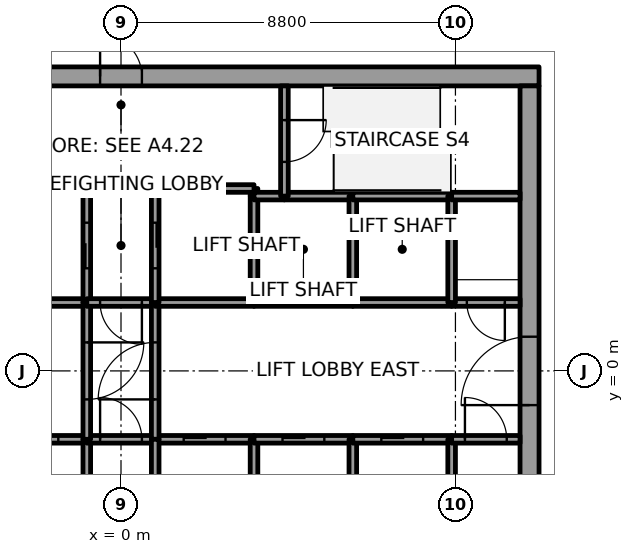
"""IFC4 building model, lengths in metres.
Left out: names, types, materials, properties, quantities, classifications, styles, units other than length and angle.
Written with IfcOpenShell. Run it as: python <this file> out.ifc"""

import sys

from ifc_helpers import new_model, si_unit, direction, frame, frame_2d, origin, place, context, subcontext, project, spatial, rectangle, extrude, element, fill, save


model = new_model("IFC4")
c1 = context("Model", 3, precision=1e-05, world=origin(), true_north=direction((0.0, 1.0)))
c2 = subcontext(c1, "Body", "Model", "MODEL_VIEW")
j1 = project(units=[si_unit("LENGTHUNIT", "METRE"), si_unit("PLANEANGLEUNIT", "RADIAN")], contexts=[c1])
p1 = place(None, origin())
s1 = spatial("IfcSite", under=j1, at=p1, CompositionType="ELEMENT")
p2 = place(p1, origin())
s2 = spatial("IfcBuilding", under=s1, at=p2, CompositionType="ELEMENT")
p3 = place(p2, frame((0.0, 0.0, 96.1)))
s3 = spatial("IfcBuildingStorey", under=s2, at=p3, CompositionType="ELEMENT", Elevation=96.1)
p4 = place(p3, frame((-11.0, 7.75, 0.0), z_axis=(0.0, 0.0, 1.0), x_axis=(1.0, 0.0, 0.0)))
e1 = element("IfcWall", 1, at=p4, inside=s3, PredefinedType="SHEAR", context=c2, shape_type="SweptSolid", body=[
    extrude(rectangle(XDim=22.0, YDim=0.5, at=frame_2d((11.0, 0.0))), origin(), (0.0, 0.0, 1.0), 3.7),
])
p5 = place(p4, frame((10.45, 0.0, 0.0)))
e2 = element("IfcOpeningElement", 2, at=p5, cuts=e1, PredefinedType="OPENING", context=c2, shape_type="SweptSolid", body=[
    extrude(rectangle(XDim=1.1, YDim=2.1, at=frame_2d((0.55, 1.05))), frame((0.0, 0.25, 0.0), z_axis=(0.0, -1.0, 0.0), x_axis=(1.0, 0.0, 0.0)), (0.0, 0.0, 1.0), 0.5),
])
p6 = place(p3, frame((10.75, -7.5, 0.0), z_axis=(0.0, 0.0, 1.0), x_axis=(0.0, 1.0, 0.0)))
e3 = element("IfcWall", 3, at=p6, inside=s3, PredefinedType="SHEAR", context=c2, shape_type="SweptSolid", body=[
    extrude(rectangle(XDim=15.0, YDim=0.5, at=frame_2d((7.5, 0.0))), origin(), (0.0, 0.0, 1.0), 3.7),
])
p7 = place(p6, frame((6.6, 0.0, 0.0)))
e4 = element("IfcOpeningElement", 4, at=p7, cuts=e3, PredefinedType="OPENING", context=c2, shape_type="SweptSolid", body=[
    extrude(rectangle(XDim=1.8, YDim=2.1, at=frame_2d((0.9, 1.05))), frame((0.0, 0.25, 0.0), z_axis=(0.0, -1.0, 0.0), x_axis=(1.0, 0.0, 0.0)), (0.0, 0.0, 1.0), 0.5),
])
p8 = place(p3, frame((-3.5, -1.8, 0.0), z_axis=(0.0, 0.0, 1.0), x_axis=(1.0, 0.0, 0.0)))
e5 = element("IfcWall", 5, at=p8, inside=s3, PredefinedType="SOLIDWALL", context=c2, shape_type="SweptSolid", body=[
    extrude(rectangle(XDim=2.6, YDim=0.2, at=frame_2d((1.3, 0.0))), origin(), (0.0, 0.0, 1.0), 3.55),
])
p9 = place(p8, frame((0.75, 0.0, 0.0)))
e6 = element("IfcOpeningElement", 6, at=p9, cuts=e5, PredefinedType="OPENING", context=c2, shape_type="SweptSolid", body=[
    extrude(rectangle(XDim=1.1, YDim=2.1, at=frame_2d((0.55, 1.05))), frame((0.0, 0.1, 0.0), z_axis=(0.0, -1.0, 0.0), x_axis=(1.0, 0.0, 0.0)), (0.0, 0.0, 1.0), 0.2),
])
p10 = place(p3, frame((-0.9, 1.8, 0.0), z_axis=(0.0, 0.0, 1.0), x_axis=(-1.0, 0.0, 0.0)))
e7 = element("IfcWall", 7, at=p10, inside=s3, PredefinedType="SOLIDWALL", context=c2, shape_type="SweptSolid", body=[
    extrude(rectangle(XDim=2.6, YDim=0.2, at=frame_2d((1.3, 0.0))), origin(), (0.0, 0.0, 1.0), 3.55),
])
p11 = place(p3, frame((-0.9, 1.8, 0.0), z_axis=(0.0, 0.0, 1.0), x_axis=(0.0, 1.0, 0.0)))
e8 = element("IfcWall", 8, at=p11, inside=s3, PredefinedType="SOLIDWALL", context=c2, shape_type="SweptSolid", body=[
    extrude(rectangle(XDim=3.0, YDim=0.2, at=frame_2d((1.5, 0.0))), origin(), (0.0, 0.0, 1.0), 3.55),
])
p12 = place(p11, frame((0.9, 0.0, 0.0)))
e9 = element("IfcOpeningElement", 9, at=p12, cuts=e8, PredefinedType="OPENING", context=c2, shape_type="SweptSolid", body=[
    extrude(rectangle(XDim=1.2, YDim=2.1, at=frame_2d((0.6, 1.05))), frame((0.0, 0.1, 0.0), z_axis=(0.0, -1.0, 0.0), x_axis=(1.0, 0.0, 0.0)), (0.0, 0.0, 1.0), 0.2),
])
p13 = place(p3, frame((-0.9, 4.8, 0.0), z_axis=(0.0, 0.0, 1.0), x_axis=(-1.0, 0.0, 0.0)))
e10 = element("IfcWall", 10, at=p13, inside=s3, PredefinedType="SOLIDWALL", context=c2, shape_type="SweptSolid", body=[
    extrude(rectangle(XDim=2.6, YDim=0.2, at=frame_2d((1.3, 0.0))), origin(), (0.0, 0.0, 1.0), 3.55),
])
p14 = place(p3, frame((-0.9, -4.6, 0.0), z_axis=(0.0, 0.0, 1.0), x_axis=(0.0, 1.0, 0.0)))
e11 = element("IfcWall", 11, at=p14, inside=s3, PredefinedType="SOLIDWALL", context=c2, shape_type="SweptSolid", body=[
    extrude(rectangle(XDim=2.8, YDim=0.2, at=frame_2d((1.4, 0.0))), origin(), (0.0, 0.0, 1.0), 3.55),
])
p15 = place(p3, frame((-0.9, -1.8, 0.0), z_axis=(0.0, 0.0, 1.0), x_axis=(1.0, 0.0, 0.0)))
e12 = element("IfcWall", 12, at=p15, inside=s3, PredefinedType="SOLIDWALL", context=c2, shape_type="SweptSolid", body=[
    extrude(rectangle(XDim=1.8, YDim=0.2, at=frame_2d((0.9, 0.0))), origin(), (0.0, 0.0, 1.0), 3.55),
])
p16 = place(p15, frame((0.35, 0.0, 0.0)))
e13 = element("IfcOpeningElement", 13, at=p16, cuts=e12, PredefinedType="OPENING", context=c2, shape_type="SweptSolid", body=[
    extrude(rectangle(XDim=1.1, YDim=2.1, at=frame_2d((0.55, 1.05))), frame((0.0, 0.1, 0.0), z_axis=(0.0, -1.0, 0.0), x_axis=(1.0, 0.0, 0.0)), (0.0, 0.0, 1.0), 0.2),
])
p17 = place(p3, frame((-0.9, 1.8, 0.0), z_axis=(0.0, 0.0, 1.0), x_axis=(0.0, -1.0, 0.0)))
e14 = element("IfcWall", 14, at=p17, inside=s3, PredefinedType="SOLIDWALL", context=c2, shape_type="SweptSolid", body=[
    extrude(rectangle(XDim=3.6, YDim=0.2, at=frame_2d((1.8, 0.0))), origin(), (0.0, 0.0, 1.0), 3.55),
])
p18 = place(p17, frame((1.05, 0.0, 0.0)))
e15 = element("IfcOpeningElement", 15, at=p18, cuts=e14, PredefinedType="OPENING", context=c2, shape_type="SweptSolid", body=[
    extrude(rectangle(XDim=1.5, YDim=2.1, at=frame_2d((0.75, 1.05))), frame((0.0, 0.1, 0.0), z_axis=(0.0, -1.0, 0.0), x_axis=(1.0, 0.0, 0.0)), (0.0, 0.0, 1.0), 0.2),
])
p19 = place(p3, frame((0.9, 1.8, 0.0), z_axis=(0.0, 0.0, 1.0), x_axis=(-1.0, 0.0, 0.0)))
e16 = element("IfcWall", 16, at=p19, inside=s3, PredefinedType="SOLIDWALL", context=c2, shape_type="SweptSolid", body=[
    extrude(rectangle(XDim=1.8, YDim=0.2, at=frame_2d((0.9, 0.0))), origin(), (0.0, 0.0, 1.0), 3.55),
])
p20 = place(p19, frame((0.35, 0.0, 0.0)))
e17 = element("IfcOpeningElement", 17, at=p20, cuts=e16, PredefinedType="OPENING", context=c2, shape_type="SweptSolid", body=[
    extrude(rectangle(XDim=1.1, YDim=2.1, at=frame_2d((0.55, 1.05))), frame((0.0, 0.1, 0.0), z_axis=(0.0, -1.0, 0.0), x_axis=(1.0, 0.0, 0.0)), (0.0, 0.0, 1.0), 0.2),
])
p21 = place(p3, frame((0.9, -1.8, 0.0), z_axis=(0.0, 0.0, 1.0), x_axis=(1.0, 0.0, 0.0)))
e18 = element("IfcWall", 18, at=p21, inside=s3, PredefinedType="SOLIDWALL", context=c2, shape_type="SweptSolid", body=[
    extrude(rectangle(XDim=2.6, YDim=0.2, at=frame_2d((1.3, 0.0))), origin(), (0.0, 0.0, 1.0), 3.55),
])
p22 = place(p21, frame((0.75, 0.0, 0.0)))
e19 = element("IfcOpeningElement", 19, at=p22, cuts=e18, PredefinedType="OPENING", context=c2, shape_type="SweptSolid", body=[
    extrude(rectangle(XDim=1.1, YDim=2.1, at=frame_2d((0.55, 1.05))), frame((0.0, 0.1, 0.0), z_axis=(0.0, -1.0, 0.0), x_axis=(1.0, 0.0, 0.0)), (0.0, 0.0, 1.0), 0.2),
])
p23 = place(p3, frame((0.9, -1.8, 0.0), z_axis=(0.0, 0.0, 1.0), x_axis=(0.0, 1.0, 0.0)))
e20 = element("IfcWall", 20, at=p23, inside=s3, PredefinedType="SOLIDWALL", context=c2, shape_type="SweptSolid", body=[
    extrude(rectangle(XDim=3.6, YDim=0.2, at=frame_2d((1.8, 0.0))), origin(), (0.0, 0.0, 1.0), 3.55),
])
p24 = place(p23, frame((1.05, 0.0, 0.0)))
e21 = element("IfcOpeningElement", 21, at=p24, cuts=e20, PredefinedType="OPENING", context=c2, shape_type="SweptSolid", body=[
    extrude(rectangle(XDim=1.5, YDim=2.1, at=frame_2d((0.75, 1.05))), frame((0.0, 0.1, 0.0), z_axis=(0.0, -1.0, 0.0), x_axis=(1.0, 0.0, 0.0)), (0.0, 0.0, 1.0), 0.2),
])
p25 = place(p3, frame((0.9, -1.8, 0.0), z_axis=(0.0, 0.0, 1.0), x_axis=(0.0, -1.0, 0.0)))
e22 = element("IfcWall", 22, at=p25, inside=s3, PredefinedType="SOLIDWALL", context=c2, shape_type="SweptSolid", body=[
    extrude(rectangle(XDim=2.8, YDim=0.2, at=frame_2d((1.4, 0.0))), origin(), (0.0, 0.0, 1.0), 3.55),
])
p26 = place(p3, frame((3.5, 1.8, 0.0), z_axis=(0.0, 0.0, 1.0), x_axis=(-1.0, 0.0, 0.0)))
e23 = element("IfcWall", 23, at=p26, inside=s3, PredefinedType="SOLIDWALL", context=c2, shape_type="SweptSolid", body=[
    extrude(rectangle(XDim=2.6, YDim=0.2, at=frame_2d((1.3, 0.0))), origin(), (0.0, 0.0, 1.0), 3.55),
])
p27 = place(p3, frame((3.5, 4.6, 0.0), z_axis=(0.0, 0.0, 1.0), x_axis=(0.0, 1.0, 0.0)))
e24 = element("IfcWall", 24, at=p27, inside=s3, PredefinedType="SOLIDWALL", context=c2, shape_type="SweptSolid", body=[
    extrude(rectangle(XDim=0.2, YDim=0.2, at=frame_2d((0.1, 0.0))), origin(), (0.0, 0.0, 1.0), 3.55),
])
p28 = place(p3, frame((3.5, 4.8, 0.0), z_axis=(0.0, 0.0, 1.0), x_axis=(-1.0, 0.0, 0.0)))
e25 = element("IfcWall", 25, at=p28, inside=s3, PredefinedType="SOLIDWALL", context=c2, shape_type="SweptSolid", body=[
    extrude(rectangle(XDim=2.6, YDim=0.2, at=frame_2d((1.3, 0.0))), origin(), (0.0, 0.0, 1.0), 3.55),
])
p29 = place(p3, frame((0.9, 4.8, 0.0), z_axis=(0.0, 0.0, 1.0), x_axis=(0.0, -1.0, 0.0)))
e26 = element("IfcWall", 26, at=p29, inside=s3, PredefinedType="SOLIDWALL", context=c2, shape_type="SweptSolid", body=[
    extrude(rectangle(XDim=3.0, YDim=0.2, at=frame_2d((1.5, 0.0))), origin(), (0.0, 0.0, 1.0), 3.55),
])
p30 = place(p29, frame((0.9, 0.0, 0.0)))
e27 = element("IfcOpeningElement", 27, at=p30, cuts=e26, PredefinedType="OPENING", context=c2, shape_type="SweptSolid", body=[
    extrude(rectangle(XDim=1.2, YDim=2.1, at=frame_2d((0.6, 1.05))), frame((0.0, 0.1, 0.0), z_axis=(0.0, -1.0, 0.0), x_axis=(1.0, 0.0, 0.0)), (0.0, 0.0, 1.0), 0.2),
])
p31 = place(p3, frame((3.5, -4.6, 0.0), z_axis=(0.0, 0.0, 1.0), x_axis=(0.0, 1.0, 0.0)))
e28 = element("IfcWall", 28, at=p31, inside=s3, PredefinedType="SOLIDWALL", context=c2, shape_type="SweptSolid", body=[
    extrude(rectangle(XDim=2.8, YDim=0.2, at=frame_2d((1.4, 0.0))), origin(), (0.0, 0.0, 1.0), 3.55),
])
p32 = place(p3, frame((3.5, -1.8, 0.0), z_axis=(0.0, 0.0, 1.0), x_axis=(1.0, 0.0, 0.0)))
e29 = element("IfcWall", 29, at=p32, inside=s3, PredefinedType="SOLIDWALL", context=c2, shape_type="SweptSolid", body=[
    extrude(rectangle(XDim=2.6, YDim=0.2, at=frame_2d((1.3, 0.0))), origin(), (0.0, 0.0, 1.0), 3.55),
])
p33 = place(p32, frame((0.75, 0.0, 0.0)))
e30 = element("IfcOpeningElement", 30, at=p33, cuts=e29, PredefinedType="OPENING", context=c2, shape_type="SweptSolid", body=[
    extrude(rectangle(XDim=1.1, YDim=2.1, at=frame_2d((0.55, 1.05))), frame((0.0, 0.1, 0.0), z_axis=(0.0, -1.0, 0.0), x_axis=(1.0, 0.0, 0.0)), (0.0, 0.0, 1.0), 0.2),
])
p34 = place(p3, frame((6.1, 1.8, 0.0), z_axis=(0.0, 0.0, 1.0), x_axis=(-1.0, 0.0, 0.0)))
e31 = element("IfcWall", 31, at=p34, inside=s3, PredefinedType="SOLIDWALL", context=c2, shape_type="SweptSolid", body=[
    extrude(rectangle(XDim=2.6, YDim=0.2, at=frame_2d((1.3, 0.0))), origin(), (0.0, 0.0, 1.0), 3.55),
])
p35 = place(p3, frame((3.5, 1.8, 0.0), z_axis=(0.0, 0.0, 1.0), x_axis=(0.0, 1.0, 0.0)))
e32 = element("IfcWall", 32, at=p35, inside=s3, PredefinedType="SOLIDWALL", context=c2, shape_type="SweptSolid", body=[
    extrude(rectangle(XDim=2.8, YDim=0.2, at=frame_2d((1.4, 0.0))), origin(), (0.0, 0.0, 1.0), 3.55),
])
p36 = place(p3, frame((4.3, 4.6, 0.0), z_axis=(0.0, 0.0, 1.0), x_axis=(-1.0, 0.0, 0.0)))
e33 = element("IfcWall", 33, at=p36, inside=s3, PredefinedType="SOLIDWALL", context=c2, shape_type="SweptSolid", body=[
    extrude(rectangle(XDim=0.8, YDim=0.2, at=frame_2d((0.4, 0.0))), origin(), (0.0, 0.0, 1.0), 3.55),
])
p37 = place(p3, frame((6.1, 4.6, 0.0), z_axis=(0.0, 0.0, 1.0), x_axis=(-1.0, 0.0, 0.0)))
e34 = element("IfcWall", 34, at=p37, inside=s3, PredefinedType="SOLIDWALL", context=c2, shape_type="SweptSolid", body=[
    extrude(rectangle(XDim=1.8, YDim=0.2, at=frame_2d((0.9, 0.0))), origin(), (0.0, 0.0, 1.0), 3.55),
])
p38 = place(p3, frame((4.3, 7.5, 0.0), z_axis=(0.0, 0.0, 1.0), x_axis=(0.0, -1.0, 0.0)))
e35 = element("IfcWall", 35, at=p38, inside=s3, PredefinedType="SOLIDWALL", context=c2, shape_type="SweptSolid", body=[
    extrude(rectangle(XDim=2.9, YDim=0.2, at=frame_2d((1.45, 0.0))), origin(), (0.0, 0.0, 1.0), 3.55),
])
p39 = place(p38, frame((0.9, 0.0, 0.0)))
e36 = element("IfcOpeningElement", 36, at=p39, cuts=e35, PredefinedType="OPENING", context=c2, shape_type="SweptSolid", body=[
    extrude(rectangle(XDim=1.1, YDim=2.1, at=frame_2d((0.55, 1.05))), frame((0.0, 0.1, 0.0), z_axis=(0.0, -1.0, 0.0), x_axis=(1.0, 0.0, 0.0)), (0.0, 0.0, 1.0), 0.2),
])
p40 = place(p3, frame((6.1, -4.6, 0.0), z_axis=(0.0, 0.0, 1.0), x_axis=(0.0, 1.0, 0.0)))
e37 = element("IfcWall", 37, at=p40, inside=s3, PredefinedType="SOLIDWALL", context=c2, shape_type="SweptSolid", body=[
    extrude(rectangle(XDim=2.8, YDim=0.2, at=frame_2d((1.4, 0.0))), origin(), (0.0, 0.0, 1.0), 3.55),
])
p41 = place(p3, frame((6.1, -1.8, 0.0), z_axis=(0.0, 0.0, 1.0), x_axis=(1.0, 0.0, 0.0)))
e38 = element("IfcWall", 38, at=p41, inside=s3, PredefinedType="SOLIDWALL", context=c2, shape_type="SweptSolid", body=[
    extrude(rectangle(XDim=2.6, YDim=0.2, at=frame_2d((1.3, 0.0))), origin(), (0.0, 0.0, 1.0), 3.55),
])
p42 = place(p41, frame((0.75, 0.0, 0.0)))
e39 = element("IfcOpeningElement", 39, at=p42, cuts=e38, PredefinedType="OPENING", context=c2, shape_type="SweptSolid", body=[
    extrude(rectangle(XDim=1.1, YDim=2.1, at=frame_2d((0.55, 1.05))), frame((0.0, 0.1, 0.0), z_axis=(0.0, -1.0, 0.0), x_axis=(1.0, 0.0, 0.0)), (0.0, 0.0, 1.0), 0.2),
])
p43 = place(p3, frame((8.7, 1.8, 0.0), z_axis=(0.0, 0.0, 1.0), x_axis=(-1.0, 0.0, 0.0)))
e40 = element("IfcWall", 40, at=p43, inside=s3, PredefinedType="SOLIDWALL", context=c2, shape_type="SweptSolid", body=[
    extrude(rectangle(XDim=2.6, YDim=0.2, at=frame_2d((1.3, 0.0))), origin(), (0.0, 0.0, 1.0), 3.55),
])
p44 = place(p3, frame((6.1, 1.8, 0.0), z_axis=(0.0, 0.0, 1.0), x_axis=(0.0, 1.0, 0.0)))
e41 = element("IfcWall", 41, at=p44, inside=s3, PredefinedType="SOLIDWALL", context=c2, shape_type="SweptSolid", body=[
    extrude(rectangle(XDim=2.8, YDim=0.2, at=frame_2d((1.4, 0.0))), origin(), (0.0, 0.0, 1.0), 3.55),
])
p45 = place(p3, frame((8.7, 4.6, 0.0), z_axis=(0.0, 0.0, 1.0), x_axis=(-1.0, 0.0, 0.0)))
e42 = element("IfcWall", 42, at=p45, inside=s3, PredefinedType="SOLIDWALL", context=c2, shape_type="SweptSolid", body=[
    extrude(rectangle(XDim=2.6, YDim=0.2, at=frame_2d((1.3, 0.0))), origin(), (0.0, 0.0, 1.0), 3.55),
])
p46 = place(p3, frame((8.7, -1.8, 0.0), z_axis=(0.0, 0.0, 1.0), x_axis=(0.0, -1.0, 0.0)))
e43 = element("IfcWall", 43, at=p46, inside=s3, PredefinedType="SOLIDWALL", context=c2, shape_type="SweptSolid", body=[
    extrude(rectangle(XDim=2.8, YDim=0.2, at=frame_2d((1.4, 0.0))), origin(), (0.0, 0.0, 1.0), 3.55),
])
p47 = place(p3, frame((8.7, -1.8, 0.0), z_axis=(0.0, 0.0, 1.0), x_axis=(1.0, 0.0, 0.0)))
e44 = element("IfcWall", 44, at=p47, inside=s3, PredefinedType="SOLIDWALL", context=c2, shape_type="SweptSolid", body=[
    extrude(rectangle(XDim=1.8, YDim=0.2, at=frame_2d((0.9, 0.0))), origin(), (0.0, 0.0, 1.0), 3.55),
])
p48 = place(p47, frame((0.35, 0.0, 0.0)))
e45 = element("IfcOpeningElement", 45, at=p48, cuts=e44, PredefinedType="OPENING", context=c2, shape_type="SweptSolid", body=[
    extrude(rectangle(XDim=1.1, YDim=2.1, at=frame_2d((0.55, 1.05))), frame((0.0, 0.1, 0.0), z_axis=(0.0, -1.0, 0.0), x_axis=(1.0, 0.0, 0.0)), (0.0, 0.0, 1.0), 0.2),
])
p49 = place(p3, frame((10.5, 1.8, 0.0), z_axis=(0.0, 0.0, 1.0), x_axis=(-1.0, 0.0, 0.0)))
e46 = element("IfcWall", 46, at=p49, inside=s3, PredefinedType="SOLIDWALL", context=c2, shape_type="SweptSolid", body=[
    extrude(rectangle(XDim=1.8, YDim=0.2, at=frame_2d((0.9, 0.0))), origin(), (0.0, 0.0, 1.0), 3.55),
])
p50 = place(p49, frame((0.4, 0.0, 0.0)))
e47 = element("IfcOpeningElement", 47, at=p50, cuts=e46, PredefinedType="OPENING", context=c2, shape_type="SweptSolid", body=[
    extrude(rectangle(XDim=1.0, YDim=2.1, at=frame_2d((0.5, 1.05))), frame((0.0, 0.1, 0.0), z_axis=(0.0, -1.0, 0.0), x_axis=(1.0, 0.0, 0.0)), (0.0, 0.0, 1.0), 0.2),
])
p51 = place(p3, frame((8.7, 4.6, 0.0), z_axis=(0.0, 0.0, 1.0), x_axis=(0.0, -1.0, 0.0)))
e48 = element("IfcWall", 48, at=p51, inside=s3, PredefinedType="SOLIDWALL", context=c2, shape_type="SweptSolid", body=[
    extrude(rectangle(XDim=2.8, YDim=0.2, at=frame_2d((1.4, 0.0))), origin(), (0.0, 0.0, 1.0), 3.55),
])
p52 = place(p3, frame((10.5, 4.6, 0.0), z_axis=(0.0, 0.0, 1.0), x_axis=(-1.0, 0.0, 0.0)))
e49 = element("IfcWall", 49, at=p52, inside=s3, PredefinedType="SOLIDWALL", context=c2, shape_type="SweptSolid", body=[
    extrude(rectangle(XDim=1.8, YDim=0.2, at=frame_2d((0.9, 0.0))), origin(), (0.0, 0.0, 1.0), 3.55),
])
p53 = place(p9, origin())
e50 = element("IfcDoor", 50, at=p53, inside=s3, OperationType="SLIDING_TO_RIGHT", PredefinedType="DOOR", context=c2, shape_type="SweptSolid", body=[
    extrude(rectangle(XDim=1.1, YDim=2.1, at=frame_2d((0.55, 1.05))), frame((0.0, 0.025, 0.0), z_axis=(0.0, -1.0, 0.0), x_axis=(1.0, 0.0, 0.0)), (0.0, 0.0, 1.0), 0.05),
])
fill(e6, e50)
p54 = place(p22, origin())
e51 = element("IfcDoor", 51, at=p54, inside=s3, OperationType="SLIDING_TO_RIGHT", PredefinedType="DOOR", context=c2, shape_type="SweptSolid", body=[
    extrude(rectangle(XDim=1.1, YDim=2.1, at=frame_2d((0.55, 1.05))), frame((0.0, 0.025, 0.0), z_axis=(0.0, -1.0, 0.0), x_axis=(1.0, 0.0, 0.0)), (0.0, 0.0, 1.0), 0.05),
])
fill(e19, e51)
p55 = place(p33, origin())
e52 = element("IfcDoor", 52, at=p55, inside=s3, OperationType="SLIDING_TO_LEFT", PredefinedType="DOOR", context=c2, shape_type="SweptSolid", body=[
    extrude(rectangle(XDim=1.1, YDim=2.1, at=frame_2d((0.55, 1.05))), frame((0.0, 0.025, 0.0), z_axis=(0.0, -1.0, 0.0), x_axis=(1.0, 0.0, 0.0)), (0.0, 0.0, 1.0), 0.05),
])
fill(e30, e52)
p56 = place(p42, origin())
e53 = element("IfcDoor", 53, at=p56, inside=s3, OperationType="SLIDING_TO_RIGHT", PredefinedType="DOOR", context=c2, shape_type="SweptSolid", body=[
    extrude(rectangle(XDim=1.1, YDim=2.1, at=frame_2d((0.55, 1.05))), frame((0.0, 0.025, 0.0), z_axis=(0.0, -1.0, 0.0), x_axis=(1.0, 0.0, 0.0)), (0.0, 0.0, 1.0), 0.05),
])
fill(e39, e53)
p57 = place(p12, origin())
e54 = element("IfcDoor", 54, at=p57, inside=s3, OperationType="SLIDING_TO_RIGHT", PredefinedType="DOOR", context=c2, shape_type="SweptSolid", body=[
    extrude(rectangle(XDim=1.2, YDim=2.1, at=frame_2d((0.6, 1.05))), frame((0.0, 0.025, 0.0), z_axis=(0.0, -1.0, 0.0), x_axis=(1.0, 0.0, 0.0)), (0.0, 0.0, 1.0), 0.05),
])
fill(e9, e54)
p58 = place(p30, origin())
e55 = element("IfcDoor", 55, at=p58, inside=s3, OperationType="SLIDING_TO_RIGHT", PredefinedType="DOOR", context=c2, shape_type="SweptSolid", body=[
    extrude(rectangle(XDim=1.2, YDim=2.1, at=frame_2d((0.6, 1.05))), frame((0.0, 0.025, 0.0), z_axis=(0.0, -1.0, 0.0), x_axis=(1.0, 0.0, 0.0)), (0.0, 0.0, 1.0), 0.05),
])
fill(e27, e55)
p59 = place(p18, origin())
e56 = element("IfcDoor", 56, at=p59, inside=s3, OperationType="DOUBLE_DOOR_SINGLE_SWING", PredefinedType="DOOR", context=c2, shape_type="SweptSolid", body=[
    extrude(rectangle(XDim=1.5, YDim=2.1, at=frame_2d((0.75, 1.05))), frame((0.0, 0.025, 0.0), z_axis=(0.0, -1.0, 0.0), x_axis=(1.0, 0.0, 0.0)), (0.0, 0.0, 1.0), 0.05),
])
fill(e15, e56)
p60 = place(p24, origin())
e57 = element("IfcDoor", 57, at=p60, inside=s3, OperationType="DOUBLE_DOOR_SINGLE_SWING", PredefinedType="DOOR", context=c2, shape_type="SweptSolid", body=[
    extrude(rectangle(XDim=1.5, YDim=2.1, at=frame_2d((0.75, 1.05))), frame((0.0, 0.025, 0.0), z_axis=(0.0, -1.0, 0.0), x_axis=(1.0, 0.0, 0.0)), (0.0, 0.0, 1.0), 0.05),
])
fill(e21, e57)
p61 = place(p48, origin())
e58 = element("IfcDoor", 58, at=p61, inside=s3, OperationType="SINGLE_SWING_RIGHT", PredefinedType="DOOR", context=c2, shape_type="SweptSolid", body=[
    extrude(rectangle(XDim=1.1, YDim=2.1, at=frame_2d((0.55, 1.05))), frame((0.0, 0.025, 0.0), z_axis=(0.0, -1.0, 0.0), x_axis=(1.0, 0.0, 0.0)), (0.0, 0.0, 1.0), 0.05),
])
fill(e45, e58)
p62 = place(p20, origin())
e59 = element("IfcDoor", 59, at=p62, inside=s3, OperationType="SINGLE_SWING_LEFT", PredefinedType="DOOR", context=c2, shape_type="SweptSolid", body=[
    extrude(rectangle(XDim=1.1, YDim=2.1, at=frame_2d((0.55, 1.05))), frame((0.0, 0.025, 0.0), z_axis=(0.0, -1.0, 0.0), x_axis=(1.0, 0.0, 0.0)), (0.0, 0.0, 1.0), 0.05),
])
fill(e17, e59)
p63 = place(p16, origin())
e60 = element("IfcDoor", 60, at=p63, inside=s3, OperationType="SINGLE_SWING_RIGHT", PredefinedType="DOOR", context=c2, shape_type="SweptSolid", body=[
    extrude(rectangle(XDim=1.1, YDim=2.1, at=frame_2d((0.55, 1.05))), frame((0.0, 0.025, 0.0), z_axis=(0.0, -1.0, 0.0), x_axis=(1.0, 0.0, 0.0)), (0.0, 0.0, 1.0), 0.05),
])
fill(e13, e60)
p64 = place(p50, origin())
e61 = element("IfcDoor", 61, at=p64, inside=s3, OperationType="SINGLE_SWING_RIGHT", PredefinedType="DOOR", context=c2, shape_type="SweptSolid", body=[
    extrude(rectangle(XDim=1.0, YDim=2.1, at=frame_2d((0.5, 1.05))), frame((0.0, 0.025, 0.0), z_axis=(0.0, -1.0, 0.0), x_axis=(1.0, 0.0, 0.0)), (0.0, 0.0, 1.0), 0.05),
])
fill(e47, e61)
p65 = place(p39, origin())
e62 = element("IfcDoor", 62, at=p65, inside=s3, OperationType="SINGLE_SWING_RIGHT", PredefinedType="DOOR", context=c2, shape_type="SweptSolid", body=[
    extrude(rectangle(XDim=1.1, YDim=2.1, at=frame_2d((0.55, 1.05))), frame((0.0, 0.025, 0.0), z_axis=(0.0, -1.0, 0.0), x_axis=(1.0, 0.0, 0.0)), (0.0, 0.0, 1.0), 0.05),
])
fill(e36, e62)
p66 = place(p7, origin())
e63 = element("IfcDoor", 63, at=p66, inside=s3, OperationType="DOUBLE_DOOR_SINGLE_SWING", PredefinedType="DOOR", context=c2, shape_type="SweptSolid", body=[
    extrude(rectangle(XDim=1.8, YDim=2.1, at=frame_2d((0.9, 1.05))), frame((0.0, 0.025, 0.0), z_axis=(0.0, -1.0, 0.0), x_axis=(1.0, 0.0, 0.0)), (0.0, 0.0, 1.0), 0.05),
])
fill(e4, e63)
p67 = place(p5, origin())
e64 = element("IfcDoor", 64, at=p67, inside=s3, OperationType="SINGLE_SWING_LEFT", PredefinedType="DOOR", context=c2, shape_type="SweptSolid", body=[
    extrude(rectangle(XDim=1.1, YDim=2.1, at=frame_2d((0.55, 1.05))), frame((0.0, 0.025, 0.0), z_axis=(0.0, -1.0, 0.0), x_axis=(1.0, 0.0, 0.0)), (0.0, 0.0, 1.0), 0.05),
])
fill(e2, e64)
save(model, sys.argv[1])
